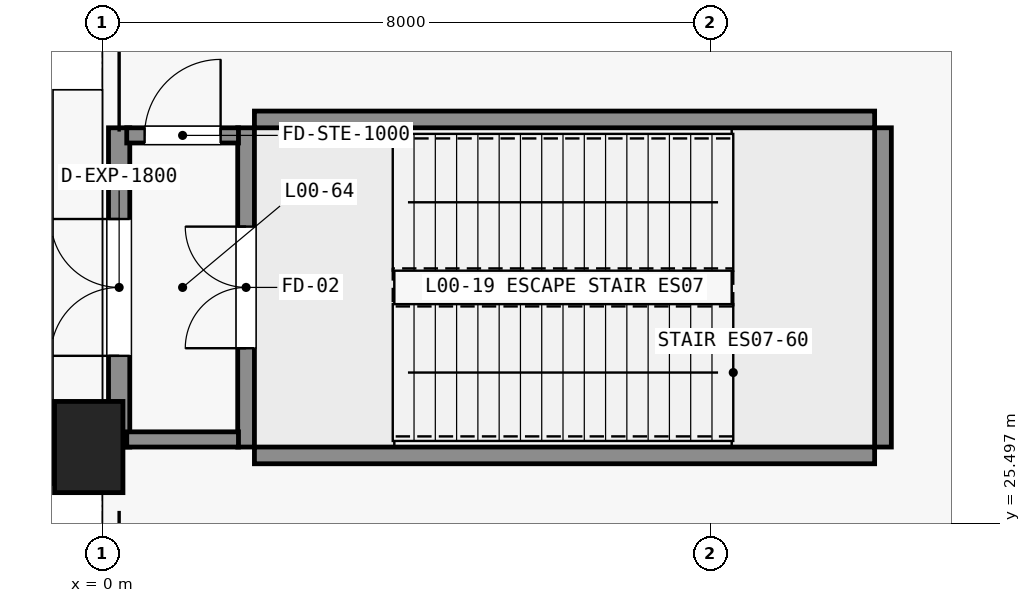
"""IFC4 building model, lengths in metres.
Left out: names, types, materials, properties, quantities, classifications, styles, units other than length and angle.
Written with IfcOpenShell. Run it as: python <this file> out.ifc"""

import sys

from ifc_helpers import new_model, si_unit, direction, frame, frame_2d, origin, origin_2d, place, context, subcontext, project, spatial, rectangle, extrude, element, fill, save


model = new_model("IFC4")
c1 = context("Model", 3, precision=1e-05, world=origin(), true_north=direction((0.0, 1.0)))
c2 = subcontext(c1, "Body", "Model", "MODEL_VIEW")
j1 = project(units=[si_unit("LENGTHUNIT", "METRE"), si_unit("PLANEANGLEUNIT", "RADIAN")], contexts=[c1])
p1 = place(None, origin())
s1 = spatial("IfcSite", under=j1, at=p1, CompositionType="ELEMENT")
p2 = place(p1, origin())
s2 = spatial("IfcBuilding", under=s1, at=p2, CompositionType="ELEMENT")
p3 = place(p2, origin())
s3 = spatial("IfcBuildingStorey", under=s2, at=p3, CompositionType="ELEMENT", Elevation=0.0)
p4 = place(p3, frame((-0.18, 26.5, -0.45), z_axis=(0.0, 0.0, 1.0), x_axis=(1.0, 0.0, 0.0)))
e1 = element("IfcColumn", 1, at=p4, inside=s3, PredefinedType="PILASTER", context=c2, shape_type="SweptSolid", body=[
    extrude(rectangle(XDim=0.9, YDim=1.2, at=origin_2d()), origin(), (0.0, 0.0, 1.0), 6.45),
])
for number, where, z_axis, x_axis in (
    (2, (2.0, 26.39, -0.45), (0.0, 0.0, 1.0), (1.0, 0.0, 0.0)),
    (3, (2.0, 30.81, -0.45), (0.0, 0.0, 1.0), (1.0, 0.0, 0.0)),
):
    element("IfcWall", number, at=place(p3, frame(where, z_axis=z_axis, x_axis=x_axis)), inside=s3, PredefinedType="SHEAR", context=c2, shape_type="SweptSolid", body=[
        extrude(rectangle(XDim=8.16, YDim=0.22, at=frame_2d((4.08, 0.0))), origin(), (0.0, 0.0, 1.0), 6.45),
    ])
p5 = place(p3, frame((1.89, 26.5, -0.45), z_axis=(0.0, 0.0, 1.0), x_axis=(0.0, 1.0, 0.0)))
e4 = element("IfcWall", 4, at=p5, inside=s3, PredefinedType="SHEAR", context=c2, shape_type="SweptSolid", body=[
    extrude(rectangle(XDim=4.2, YDim=0.22, at=frame_2d((2.1, 0.0))), origin(), (0.0, 0.0, 1.0), 6.45),
])
p6 = place(p5, frame((1.3, 0.0, 0.45)))
e5 = element("IfcOpeningElement", 5, at=p6, cuts=e4, PredefinedType="OPENING", context=c2, shape_type="SweptSolid", body=[
    extrude(rectangle(XDim=1.6, YDim=2.2, at=frame_2d((0.8, 1.1))), frame((0.0, 0.12, 0.0), z_axis=(0.0, -1.0, 0.0), x_axis=(1.0, 0.0, 0.0)), (0.0, 0.0, 1.0), 0.24),
])
p7 = place(p3, frame((10.27, 26.5, -0.45), z_axis=(0.0, 0.0, 1.0), x_axis=(0.0, 1.0, 0.0)))
e6 = element("IfcWall", 6, at=p7, inside=s3, PredefinedType="SHEAR", context=c2, shape_type="SweptSolid", body=[
    extrude(rectangle(XDim=4.2, YDim=0.22, at=frame_2d((2.1, 0.0))), origin(), (0.0, 0.0, 1.0), 6.45),
])
p8 = place(p3, frame((0.22, 26.5, 0.0), z_axis=(0.0, 0.0, 1.0), x_axis=(0.0, 1.0, 0.0)))
e7 = element("IfcWall", 7, at=p8, inside=s3, PredefinedType="STANDARD", context=c2, shape_type="SweptSolid", body=[
    extrude(rectangle(XDim=4.2, YDim=0.28, at=frame_2d((2.1, 0.0))), origin(), (0.0, 0.0, 1.0), 5.64),
])
p9 = place(p8, frame((1.2, 0.0, 0.0)))
e8 = element("IfcOpeningElement", 8, at=p9, cuts=e7, PredefinedType="OPENING", context=c2, shape_type="SweptSolid", body=[
    extrude(rectangle(XDim=1.8, YDim=2.25, at=frame_2d((0.9, 1.125))), frame((0.0, 0.15, 0.0), z_axis=(0.0, -1.0, 0.0), x_axis=(1.0, 0.0, 0.0)), (0.0, 0.0, 1.0), 0.3),
])
p10 = place(p3, frame((0.32, 26.6, 0.0), z_axis=(0.0, 0.0, 1.0), x_axis=(1.0, 0.0, 0.0)))
e9 = element("IfcWall", 9, at=p10, inside=s3, PredefinedType="STANDARD", context=c2, shape_type="SweptSolid", body=[
    extrude(rectangle(XDim=1.47, YDim=0.2, at=frame_2d((0.735, 0.0))), origin(), (0.0, 0.0, 1.0), 4.89),
])
p11 = place(p3, frame((0.32, 30.6, 0.0), z_axis=(0.0, 0.0, 1.0), x_axis=(1.0, 0.0, 0.0)))
e10 = element("IfcWall", 10, at=p11, inside=s3, PredefinedType="STANDARD", context=c2, shape_type="SweptSolid", body=[
    extrude(rectangle(XDim=1.47, YDim=0.2, at=frame_2d((0.735, 0.0))), origin(), (0.0, 0.0, 1.0), 4.89),
])
p12 = place(p11, frame((0.235, 0.0, 0.0)))
e11 = element("IfcOpeningElement", 11, at=p12, cuts=e10, PredefinedType="OPENING", context=c2, shape_type="SweptSolid", body=[
    extrude(rectangle(XDim=1.0, YDim=2.15, at=frame_2d((0.5, 1.075))), frame((0.0, 0.11, 0.0), z_axis=(0.0, -1.0, 0.0), x_axis=(1.0, 0.0, 0.0)), (0.0, 0.0, 1.0), 0.22),
])
p13 = place(p6, origin())
e12 = element("IfcDoor", 12, at=p13, inside=s3, OperationType="DOUBLE_DOOR_SINGLE_SWING", PredefinedType="DOOR", context=c2, shape_type="SweptSolid", body=[
    extrude(rectangle(XDim=1.6, YDim=2.2, at=frame_2d((0.8, 1.1))), frame((0.0, 0.025, 0.0), z_axis=(0.0, -1.0, 0.0), x_axis=(1.0, 0.0, 0.0)), (0.0, 0.0, 1.0), 0.05),
])
fill(e5, e12)
p14 = place(p9, origin())
e13 = element("IfcDoor", 13, at=p14, inside=s3, OperationType="DOUBLE_DOOR_SINGLE_SWING", PredefinedType="DOOR", context=c2, shape_type="SweptSolid", body=[
    extrude(rectangle(XDim=1.8, YDim=2.25, at=frame_2d((0.9, 1.125))), frame((0.0, 0.025, 0.0), z_axis=(0.0, -1.0, 0.0), x_axis=(1.0, 0.0, 0.0)), (0.0, 0.0, 1.0), 0.05),
])
fill(e8, e13)
p15 = place(p12, origin())
e14 = element("IfcDoor", 14, at=p15, inside=s3, OperationType="SINGLE_SWING_RIGHT", PredefinedType="DOOR", context=c2, shape_type="SweptSolid", body=[
    extrude(rectangle(XDim=1.0, YDim=2.15, at=frame_2d((0.5, 1.075))), frame((0.0, 0.025, 0.0), z_axis=(0.0, -1.0, 0.0), x_axis=(1.0, 0.0, 0.0)), (0.0, 0.0, 1.0), 0.05),
])
fill(e11, e14)
save(model, sys.argv[1])
